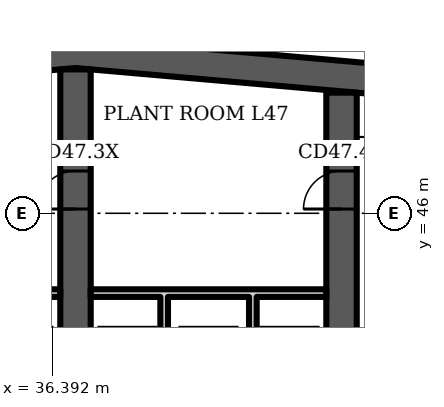
"""IFC4 building model, lengths in metres.
Left out: names, types, materials, properties, quantities, classifications, styles, units other than length and angle.
Written with IfcOpenShell. Run it as: python <this file> out.ifc"""

import sys

from ifc_helpers import new_model, si_unit, direction, frame, frame_2d, origin, place, context, subcontext, project, spatial, polyline, rectangle, outline, extrude, element, fill, save


model = new_model("IFC4")
c1 = context("Model", 3, precision=1e-05, world=origin(), true_north=direction((0.0, 1.0)))
c2 = subcontext(c1, "Body", "Model", "MODEL_VIEW")
j1 = project(units=[si_unit("LENGTHUNIT", "METRE"), si_unit("PLANEANGLEUNIT", "RADIAN")], contexts=[c1])
p1 = place(None, origin())
s1 = spatial("IfcSite", under=j1, at=p1, CompositionType="ELEMENT")
p2 = place(p1, origin())
s2 = spatial("IfcBuilding", under=s1, at=p2, CompositionType="ELEMENT")
p3 = place(p2, frame((0.0, 0.0, 191.5)))
s3 = spatial("IfcBuildingStorey", under=s2, at=p3, CompositionType="ELEMENT", Elevation=191.5)
p4 = place(p3, origin())
e1 = element("IfcWall", 1, at=p4, inside=s3, PredefinedType="SHEAR", context=c2, shape_type="SweptSolid", body=[
    extrude(outline(polyline([(16.0, 47.984), (37.0, 49.822), (58.0, 47.984), (58.0, 48.787), (37.0, 50.625), (16.0, 48.787), (16.0, 47.984)])), origin(), (0.0, 0.0, 1.0), 3.6),
])
p5 = place(p3, frame((37.0, 34.8, 0.0), z_axis=(0.0, 0.0, 1.0), x_axis=(0.0, 1.0, 0.0)))
e2 = element("IfcWall", 2, at=p5, inside=s3, PredefinedType="SHEAR", context=c2, shape_type="SweptSolid", body=[
    extrude(rectangle(XDim=14.987, YDim=0.8, at=frame_2d((7.493, 0.0))), origin(), (0.0, 0.0, 1.0), 3.6),
])
p6 = place(p5, frame((11.312, 0.0, 0.0)))
e3 = element("IfcOpeningElement", 3, at=p6, cuts=e2, PredefinedType="OPENING", context=c2, shape_type="SweptSolid", body=[
    extrude(rectangle(XDim=1.0, YDim=2.1, at=frame_2d((0.5, 1.05))), frame((0.0, 0.41, 0.0), z_axis=(0.0, -1.0, 0.0), x_axis=(1.0, 0.0, 0.0)), (0.0, 0.0, 1.0), 0.82),
])
p7 = place(p5, frame((3.6, 0.0, 0.0)))
e4 = element("IfcOpeningElement", 4, at=p7, cuts=e2, PredefinedType="OPENING", context=c2, shape_type="SweptSolid", body=[
    extrude(rectangle(XDim=1.1, YDim=2.1, at=frame_2d((0.55, 1.05))), frame((0.0, 0.41, 0.0), z_axis=(0.0, -1.0, 0.0), x_axis=(1.0, 0.0, 0.0)), (0.0, 0.0, 1.0), 0.82),
])
p8 = place(p3, frame((44.0, 34.8, 0.0), z_axis=(0.0, 0.0, 1.0), x_axis=(0.0, 1.0, 0.0)))
e5 = element("IfcWall", 5, at=p8, inside=s3, PredefinedType="SHEAR", context=c2, shape_type="SweptSolid", body=[
    extrude(rectangle(XDim=14.374, YDim=0.8, at=frame_2d((7.187, 0.0))), origin(), (0.0, 0.0, 1.0), 3.6),
])
p9 = place(p8, frame((11.312, 0.0, 0.0)))
e6 = element("IfcOpeningElement", 6, at=p9, cuts=e5, PredefinedType="OPENING", context=c2, shape_type="SweptSolid", body=[
    extrude(rectangle(XDim=1.0, YDim=2.1, at=frame_2d((0.5, 1.05))), frame((0.0, 0.41, 0.0), z_axis=(0.0, -1.0, 0.0), x_axis=(1.0, 0.0, 0.0)), (0.0, 0.0, 1.0), 0.82),
])
p10 = place(p8, frame((3.6, 0.0, 0.0)))
e7 = element("IfcOpeningElement", 7, at=p10, cuts=e5, PredefinedType="OPENING", context=c2, shape_type="SweptSolid", body=[
    extrude(rectangle(XDim=1.1, YDim=2.1, at=frame_2d((0.55, 1.05))), frame((0.0, 0.41, 0.0), z_axis=(0.0, -1.0, 0.0), x_axis=(1.0, 0.0, 0.0)), (0.0, 0.0, 1.0), 0.82),
])
p11 = place(p3, frame((0.0, 0.0, -0.0)))
e8 = element("IfcWall", 8, at=p11, inside=s3, PredefinedType="PARTITIONING", context=c2, shape_type="SweptSolid", body=[
    extrude(outline(polyline([(32.433, 40.8), (32.233, 40.8), (32.233, 43.8), (30.4, 43.8), (30.4, 44.0), (36.6, 44.0), (36.6, 43.8), (34.767, 43.8), (34.767, 40.8), (34.567, 40.8), (34.567, 43.8), (32.433, 43.8), (32.433, 40.8)])), origin(), (0.0, 0.0, 1.0), 3.2),
])
p12 = place(p3, frame((0.0, 0.0, -0.0)))
e9 = element("IfcWall", 9, at=p12, inside=s3, PredefinedType="PARTITIONING", context=c2, shape_type="SweptSolid", body=[
    extrude(outline(polyline([(39.433, 40.8), (39.233, 40.8), (39.233, 43.8), (37.4, 43.8), (37.4, 44.0), (43.6, 44.0), (43.6, 43.8), (41.767, 43.8), (41.767, 40.8), (41.567, 40.8), (41.567, 43.8), (39.433, 43.8), (39.433, 40.8)])), origin(), (0.0, 0.0, 1.0), 3.2),
])
p13 = place(p6, origin())
e10 = element("IfcDoor", 10, at=p13, inside=s3, OperationType="SINGLE_SWING_LEFT", PredefinedType="DOOR", context=c2, shape_type="SweptSolid", body=[
    extrude(rectangle(XDim=1.0, YDim=2.1, at=frame_2d((0.5, 1.05))), frame((0.0, 0.4, 0.0), z_axis=(0.0, -1.0, 0.0), x_axis=(1.0, 0.0, 0.0)), (0.0, 0.0, 1.0), 0.8),
])
fill(e3, e10)
p14 = place(p9, origin())
e11 = element("IfcDoor", 11, at=p14, inside=s3, OperationType="SINGLE_SWING_LEFT", PredefinedType="DOOR", context=c2, shape_type="SweptSolid", body=[
    extrude(rectangle(XDim=1.0, YDim=2.1, at=frame_2d((0.5, 1.05))), frame((0.0, 0.4, 0.0), z_axis=(0.0, -1.0, 0.0), x_axis=(1.0, 0.0, 0.0)), (0.0, 0.0, 1.0), 0.8),
])
fill(e6, e11)
save(model, sys.argv[1])
